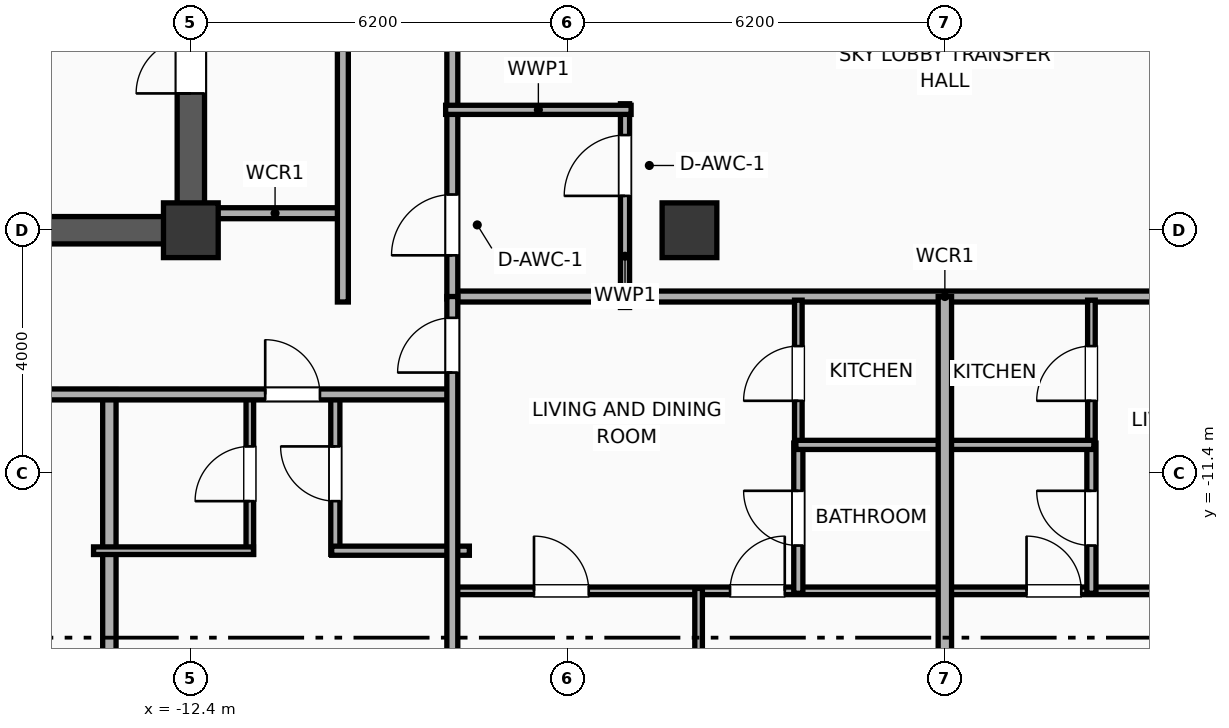
"""IFC4 building model, lengths in metres.
Left out: names, types, materials, properties, quantities, classifications, styles, units other than length and angle.
Written with IfcOpenShell. Run it as: python <this file> out.ifc"""

import sys

from ifc_helpers import new_model, si_unit, direction, frame, frame_2d, origin, origin_2d, place, context, subcontext, project, spatial, rectangle, extrude, element, fill, save


model = new_model("IFC4")
c1 = context("Model", 3, precision=1e-05, world=origin(), true_north=direction((0.0, 1.0)))
c2 = subcontext(c1, "Body", "Model", "MODEL_VIEW")
j1 = project(units=[si_unit("LENGTHUNIT", "METRE"), si_unit("PLANEANGLEUNIT", "RADIAN")], contexts=[c1])
p1 = place(None, origin())
s1 = spatial("IfcSite", under=j1, at=p1, CompositionType="ELEMENT")
p2 = place(p1, origin())
s2 = spatial("IfcBuilding", under=s1, at=p2, CompositionType="ELEMENT")
p3 = place(p2, frame((0.0, 0.0, 200.2)))
s3 = spatial("IfcBuildingStorey", under=s2, at=p3, CompositionType="ELEMENT", Elevation=200.2)
p4 = place(p3, frame((-12.4, -7.4, 0.0), z_axis=(0.0, 0.0, 1.0), x_axis=(1.0, 0.0, 0.0)))
e1 = element("IfcColumn", 1, at=p4, inside=s3, PredefinedType="COLUMN", context=c2, shape_type="SweptSolid", body=[
    extrude(rectangle(XDim=0.9, YDim=0.9, at=origin_2d()), origin(), (0.0, 0.0, 1.0), 3.9),
])
p5 = place(p3, frame((-19.425, -7.4, 0.0), z_axis=(0.0, 0.0, 1.0), x_axis=(1.0, 0.0, 0.0)))
e2 = element("IfcWall", 2, at=p5, inside=s3, PredefinedType="SHEAR", context=c2, shape_type="SweptSolid", body=[
    extrude(rectangle(XDim=7.25, YDim=0.45, at=frame_2d((3.625, 0.0))), origin(), (0.0, 0.0, 1.0), 3.65),
])
p6 = place(p3, frame((-12.4, -7.4, 0.0), z_axis=(0.0, 0.0, 1.0), x_axis=(0.0, 1.0, 0.0)))
e3 = element("IfcWall", 3, at=p6, inside=s3, PredefinedType="SHEAR", context=c2, shape_type="SweptSolid", body=[
    extrude(rectangle(XDim=14.8, YDim=0.45, at=frame_2d((7.4, 0.0))), origin(), (0.0, 0.0, 1.0), 3.65),
])
p7 = place(p6, frame((6.05, 0.0, 0.0)))
e4 = element("IfcOpeningElement", 4, at=p7, cuts=e3, PredefinedType="OPENING", context=c2, shape_type="SweptSolid", body=[
    extrude(rectangle(XDim=1.1, YDim=2.05, at=frame_2d((0.55, 1.025))), frame((0.0, 0.235, 0.0), z_axis=(0.0, -1.0, 0.0), x_axis=(1.0, 0.0, 0.0)), (0.0, 0.0, 1.0), 0.47),
])
p8 = place(p6, frame((8.6, 0.0, 0.0)))
e5 = element("IfcOpeningElement", 5, at=p8, cuts=e3, PredefinedType="OPENING", context=c2, shape_type="SweptSolid", body=[
    extrude(rectangle(XDim=1.1, YDim=2.05, at=frame_2d((0.55, 1.025))), frame((0.0, 0.235, 0.0), z_axis=(0.0, -1.0, 0.0), x_axis=(1.0, 0.0, 0.0)), (0.0, 0.0, 1.0), 0.47),
])
p9 = place(p6, frame((10.53, 0.0, 0.0)))
e6 = element("IfcOpeningElement", 6, at=p9, cuts=e3, PredefinedType="OPENING", context=c2, shape_type="SweptSolid", body=[
    extrude(rectangle(XDim=1.1, YDim=2.05, at=frame_2d((0.55, 1.025))), frame((0.0, 0.235, 0.0), z_axis=(0.0, -1.0, 0.0), x_axis=(1.0, 0.0, 0.0)), (0.0, 0.0, 1.0), 0.47),
])
p10 = place(p6, frame((2.25, 0.0, 0.0)))
e7 = element("IfcOpeningElement", 7, at=p10, cuts=e3, PredefinedType="OPENING", context=c2, shape_type="SweptSolid", body=[
    extrude(rectangle(XDim=0.9, YDim=2.05, at=frame_2d((0.45, 1.025))), frame((0.0, 0.235, 0.0), z_axis=(0.0, -1.0, 0.0), x_axis=(1.0, 0.0, 0.0)), (0.0, 0.0, 1.0), 0.47),
])
p11 = place(p3, frame((-4.2, -7.4, 0.0), z_axis=(0.0, 0.0, 1.0), x_axis=(1.0, 0.0, 0.0)))
e8 = element("IfcColumn", 8, at=p11, inside=s3, PredefinedType="COLUMN", context=c2, shape_type="SweptSolid", body=[
    extrude(rectangle(XDim=0.9, YDim=0.9, at=origin_2d()), origin(), (0.0, 0.0, 1.0), 3.9),
])
p12 = place(p3, frame((-12.15, -7.12, 0.0), z_axis=(0.0, 0.0, 1.0), x_axis=(1.0, 0.0, 0.0)))
e9 = element("IfcWall", 9, at=p12, inside=s3, PredefinedType="PARTITIONING", context=c2, shape_type="SweptSolid", body=[
    extrude(rectangle(XDim=2.27, YDim=0.18, at=frame_2d((1.135, 0.0))), origin(), (0.0, 0.0, 1.0), 3.65),
])
p13 = place(p3, frame((-9.9, -8.58, 0.0), z_axis=(0.0, 0.0, 1.0), x_axis=(0.0, 1.0, 0.0)))
e10 = element("IfcWall", 10, at=p13, inside=s3, PredefinedType="PARTITIONING", context=c2, shape_type="SweptSolid", body=[
    extrude(rectangle(XDim=17.16, YDim=0.18, at=frame_2d((8.58, 0.0))), origin(), (0.0, 0.0, 1.0), 3.65),
])
p14 = place(p13, frame((7.172, 0.0, 0.0)))
e11 = element("IfcOpeningElement", 11, at=p14, cuts=e10, PredefinedType="OPENING", context=c2, shape_type="SweptSolid", body=[
    extrude(rectangle(XDim=1.1, YDim=2.05, at=frame_2d((0.55, 1.025))), frame((0.0, 0.1, 0.0), z_axis=(0.0, -1.0, 0.0), x_axis=(1.0, 0.0, 0.0)), (0.0, 0.0, 1.0), 0.2),
])
p15 = place(p3, frame((-8.15, -8.49, 0.0), z_axis=(0.0, 0.0, 1.0), x_axis=(1.0, 0.0, 0.0)))
e12 = element("IfcWall", 12, at=p15, inside=s3, PredefinedType="PARTITIONING", context=c2, shape_type="SweptSolid", body=[
    extrude(rectangle(XDim=16.3, YDim=0.18, at=frame_2d((8.15, 0.0))), origin(), (0.0, 0.0, 1.0), 3.65),
])
p16 = place(p3, frame((-8.1, -8.53, 0.0), z_axis=(0.0, 0.0, 1.0), x_axis=(0.0, 1.0, 0.0)))
e13 = element("IfcWall", 13, at=p16, inside=s3, PredefinedType="PARTITIONING", context=c2, shape_type="SweptSolid", body=[
    extrude(rectangle(XDim=7.61, YDim=0.18, at=frame_2d((3.805, 0.0))), origin(), (0.0, 0.0, 1.0), 3.65),
])
p17 = place(p16, frame((0.718, 0.0, 0.0)))
e14 = element("IfcOpeningElement", 14, at=p17, cuts=e13, PredefinedType="OPENING", context=c2, shape_type="SweptSolid", body=[
    extrude(rectangle(XDim=1.0, YDim=2.05, at=frame_2d((0.5, 1.025))), frame((0.0, 0.1, 0.0), z_axis=(0.0, -1.0, 0.0), x_axis=(1.0, 0.0, 0.0)), (0.0, 0.0, 1.0), 0.2),
])
p18 = place(p3, frame((-5.26, -8.67, 0.0), z_axis=(0.0, 0.0, 1.0), x_axis=(0.0, 1.0, 0.0)))
e15 = element("IfcWall", 15, at=p18, inside=s3, PredefinedType="PLUMBINGWALL", context=c2, shape_type="SweptSolid", body=[
    extrude(rectangle(XDim=3.35, YDim=0.15, at=frame_2d((1.675, 0.0))), origin(), (0.0, 0.0, 1.0), 3.65),
])
p19 = place(p18, frame((1.835, 0.0, 0.0)))
e16 = element("IfcOpeningElement", 16, at=p19, cuts=e15, PredefinedType="OPENING", context=c2, shape_type="SweptSolid", body=[
    extrude(rectangle(XDim=1.0, YDim=2.05, at=frame_2d((0.5, 1.025))), frame((0.0, 0.085, 0.0), z_axis=(0.0, -1.0, 0.0), x_axis=(1.0, 0.0, 0.0)), (0.0, 0.0, 1.0), 0.17),
])
p20 = place(p3, frame((-8.21, -5.42, 0.0), z_axis=(0.0, 0.0, 1.0), x_axis=(1.0, 0.0, 0.0)))
e17 = element("IfcWall", 17, at=p20, inside=s3, PredefinedType="PLUMBINGWALL", context=c2, shape_type="SweptSolid", body=[
    extrude(rectangle(XDim=3.05, YDim=0.15, at=frame_2d((1.525, 0.0))), origin(), (0.0, 0.0, 1.0), 3.65),
])
p21 = place(p3, frame((-13.74, -18.83, 0.0), z_axis=(0.0, 0.0, 1.0), x_axis=(0.0, 1.0, 0.0)))
e18 = element("IfcWall", 18, at=p21, inside=s3, PredefinedType="PARTITIONING", context=c2, shape_type="SweptSolid", body=[
    extrude(rectangle(XDim=8.81, YDim=0.22, at=frame_2d((4.405, 0.0))), origin(), (0.0, 0.0, 1.0), 3.65),
])
p22 = place(p3, frame((-11.43, -12.73, 0.0), z_axis=(0.0, 0.0, 1.0), x_axis=(0.0, 1.0, 0.0)))
e19 = element("IfcWall", 19, at=p22, inside=s3, PredefinedType="PARTITIONING", context=c2, shape_type="SweptSolid", body=[
    extrude(rectangle(XDim=2.65, YDim=0.125, at=frame_2d((1.325, 0.0))), origin(), (0.0, 0.0, 1.0), 3.65),
])
p23 = place(p22, frame((0.875, 0.0, 0.0)))
e20 = element("IfcOpeningElement", 20, at=p23, cuts=e19, PredefinedType="OPENING", context=c2, shape_type="SweptSolid", body=[
    extrude(rectangle(XDim=0.9, YDim=2.05, at=frame_2d((0.45, 1.025))), frame((0.0, 0.073, 0.0), z_axis=(0.0, -1.0, 0.0), x_axis=(1.0, 0.0, 0.0)), (0.0, 0.0, 1.0), 0.145),
])
p24 = place(p3, frame((-10.024, -12.73, 0.0), z_axis=(0.0, 0.0, 1.0), x_axis=(0.0, 1.0, 0.0)))
e21 = element("IfcWall", 21, at=p24, inside=s3, PredefinedType="PLUMBINGWALL", context=c2, shape_type="SweptSolid", body=[
    extrude(rectangle(XDim=2.65, YDim=0.15, at=frame_2d((1.325, 0.0))), origin(), (0.0, 0.0, 1.0), 3.65),
])
p25 = place(p24, frame((0.875, 0.0, 0.0)))
e22 = element("IfcOpeningElement", 22, at=p25, cuts=e21, PredefinedType="OPENING", context=c2, shape_type="SweptSolid", body=[
    extrude(rectangle(XDim=0.9, YDim=2.05, at=frame_2d((0.45, 1.025))), frame((0.0, 0.085, 0.0), z_axis=(0.0, -1.0, 0.0), x_axis=(1.0, 0.0, 0.0)), (0.0, 0.0, 1.0), 0.17),
])
p26 = place(p3, frame((-14.0, -12.67, 0.0), z_axis=(0.0, 0.0, 1.0), x_axis=(1.0, 0.0, 0.0)))
e23 = element("IfcWall", 23, at=p26, inside=s3, PredefinedType="PARTITIONING", context=c2, shape_type="SweptSolid", body=[
    extrude(rectangle(XDim=2.63, YDim=0.125, at=frame_2d((1.315, 0.0))), origin(), (0.0, 0.0, 1.0), 3.65),
])
p27 = place(p3, frame((-10.084, -12.67, 0.0), z_axis=(0.0, 0.0, 1.0), x_axis=(1.0, 0.0, 0.0)))
e24 = element("IfcWall", 24, at=p27, inside=s3, PredefinedType="PLUMBINGWALL", context=c2, shape_type="SweptSolid", body=[
    extrude(rectangle(XDim=2.264, YDim=0.15, at=frame_2d((1.132, 0.0))), origin(), (0.0, 0.0, 1.0), 3.65),
])
p28 = place(p3, frame((-19.5, -10.1, 0.0), z_axis=(0.0, 0.0, 1.0), x_axis=(1.0, 0.0, 0.0)))
e25 = element("IfcWall", 25, at=p28, inside=s3, PredefinedType="PARTITIONING", context=c2, shape_type="SweptSolid", body=[
    extrude(rectangle(XDim=11.42, YDim=0.18, at=frame_2d((5.71, 0.0))), origin(), (0.0, 0.0, 1.0), 3.65),
])
p29 = place(p28, frame((2.324, 0.0, 0.0)))
e26 = element("IfcOpeningElement", 26, at=p29, cuts=e25, PredefinedType="OPENING", context=c2, shape_type="SweptSolid", body=[
    extrude(rectangle(XDim=1.15, YDim=2.05, at=frame_2d((0.575, 1.025))), frame((0.0, 0.1, 0.0), z_axis=(0.0, -1.0, 0.0), x_axis=(1.0, 0.0, 0.0)), (0.0, 0.0, 1.0), 0.2),
])
p30 = place(p28, frame((8.323, 0.0, 0.0)))
e27 = element("IfcOpeningElement", 27, at=p30, cuts=e25, PredefinedType="OPENING", context=c2, shape_type="SweptSolid", body=[
    extrude(rectangle(XDim=0.9, YDim=2.05, at=frame_2d((0.45, 1.025))), frame((0.0, 0.1, 0.0), z_axis=(0.0, -1.0, 0.0), x_axis=(1.0, 0.0, 0.0)), (0.0, 0.0, 1.0), 0.2),
])
p31 = place(p3, frame((-8.08, -13.33, 0.0), z_axis=(0.0, 0.0, 1.0), x_axis=(1.0, 0.0, 0.0)))
e28 = element("IfcWall", 28, at=p31, inside=s3, PredefinedType="PARTITIONING", context=c2, shape_type="SweptSolid", body=[
    extrude(rectangle(XDim=8.06, YDim=0.125, at=frame_2d((4.03, 0.0))), origin(), (0.0, 0.0, 1.0), 3.65),
])
p32 = place(p31, frame((1.323, 0.0, 0.0)))
e29 = element("IfcOpeningElement", 29, at=p32, cuts=e28, PredefinedType="OPENING", context=c2, shape_type="SweptSolid", body=[
    extrude(rectangle(XDim=0.9, YDim=2.05, at=frame_2d((0.45, 1.025))), frame((0.0, 0.073, 0.0), z_axis=(0.0, -1.0, 0.0), x_axis=(1.0, 0.0, 0.0)), (0.0, 0.0, 1.0), 0.145),
])
p33 = place(p31, frame((4.547, 0.0, 0.0)))
e30 = element("IfcOpeningElement", 30, at=p33, cuts=e28, PredefinedType="OPENING", context=c2, shape_type="SweptSolid", body=[
    extrude(rectangle(XDim=0.9, YDim=2.05, at=frame_2d((0.45, 1.025))), frame((0.0, 0.073, 0.0), z_axis=(0.0, -1.0, 0.0), x_axis=(1.0, 0.0, 0.0)), (0.0, 0.0, 1.0), 0.145),
])
p34 = place(p3, frame((-2.41, -10.96, 0.0), z_axis=(0.0, 0.0, 1.0), x_axis=(0.0, 1.0, 0.0)))
e31 = element("IfcWall", 31, at=p34, inside=s3, PredefinedType="PARTITIONING", context=c2, shape_type="SweptSolid", body=[
    extrude(rectangle(XDim=2.41, YDim=0.125, at=frame_2d((1.205, 0.0))), origin(), (0.0, 0.0, 1.0), 3.65),
])
p35 = place(p34, frame((0.755, 0.0, 0.0)))
e32 = element("IfcOpeningElement", 32, at=p35, cuts=e31, PredefinedType="OPENING", context=c2, shape_type="SweptSolid", body=[
    extrude(rectangle(XDim=0.9, YDim=2.05, at=frame_2d((0.45, 1.025))), frame((0.0, 0.073, 0.0), z_axis=(0.0, -1.0, 0.0), x_axis=(1.0, 0.0, 0.0)), (0.0, 0.0, 1.0), 0.145),
])
p36 = place(p3, frame((-2.41, -13.37, 0.0), z_axis=(0.0, 0.0, 1.0), x_axis=(0.0, 1.0, 0.0)))
e33 = element("IfcWall", 33, at=p36, inside=s3, PredefinedType="PLUMBINGWALL", context=c2, shape_type="SweptSolid", body=[
    extrude(rectangle(XDim=2.47, YDim=0.15, at=frame_2d((1.235, 0.0))), origin(), (0.0, 0.0, 1.0), 3.65),
])
p37 = place(p36, frame((0.785, 0.0, 0.0)))
e34 = element("IfcOpeningElement", 34, at=p37, cuts=e33, PredefinedType="OPENING", context=c2, shape_type="SweptSolid", body=[
    extrude(rectangle(XDim=0.9, YDim=2.05, at=frame_2d((0.45, 1.025))), frame((0.0, 0.085, 0.0), z_axis=(0.0, -1.0, 0.0), x_axis=(1.0, 0.0, 0.0)), (0.0, 0.0, 1.0), 0.17),
])
p38 = place(p3, frame((-2.45, -10.93, 0.0), z_axis=(0.0, 0.0, 1.0), x_axis=(1.0, 0.0, 0.0)))
e35 = element("IfcWall", 35, at=p38, inside=s3, PredefinedType="PLUMBINGWALL", context=c2, shape_type="SweptSolid", body=[
    extrude(rectangle(XDim=2.43, YDim=0.15, at=frame_2d((1.215, 0.0))), origin(), (0.0, 0.0, 1.0), 3.65),
])
p39 = place(p3, frame((-4.05, -18.83, 0.0), z_axis=(0.0, 0.0, 1.0), x_axis=(0.0, 1.0, 0.0)))
e36 = element("IfcWall", 36, at=p39, inside=s3, PredefinedType="PARTITIONING", context=c2, shape_type="SweptSolid", body=[
    extrude(rectangle(XDim=5.54, YDim=0.125, at=frame_2d((2.77, 0.0))), origin(), (0.0, 0.0, 1.0), 2.54),
])
p40 = place(p3, frame((-8.1, -18.83, 0.0), z_axis=(0.0, 0.0, 1.0), x_axis=(0.0, 1.0, 0.0)))
e37 = element("IfcWall", 37, at=p40, inside=s3, PredefinedType="PARTITIONING", context=c2, shape_type="SweptSolid", body=[
    extrude(rectangle(XDim=10.34, YDim=0.18, at=frame_2d((5.17, 0.0))), origin(), (0.0, 0.0, 1.0), 3.65),
])
p41 = place(p40, frame((9.09, 0.0, 0.0)))
e38 = element("IfcOpeningElement", 38, at=p41, cuts=e37, PredefinedType="OPENING", context=c2, shape_type="SweptSolid", body=[
    extrude(rectangle(XDim=0.9, YDim=2.05, at=frame_2d((0.45, 1.025))), frame((0.0, 0.1, 0.0), z_axis=(0.0, -1.0, 0.0), x_axis=(1.0, 0.0, 0.0)), (0.0, 0.0, 1.0), 0.2),
])
p42 = place(p3, frame((0.02, -13.33, 0.0), z_axis=(0.0, 0.0, 1.0), x_axis=(1.0, 0.0, 0.0)))
e39 = element("IfcWall", 39, at=p42, inside=s3, PredefinedType="PARTITIONING", context=c2, shape_type="SweptSolid", body=[
    extrude(rectangle(XDim=8.06, YDim=0.125, at=frame_2d((4.03, 0.0))), origin(), (0.0, 0.0, 1.0), 3.65),
])
p43 = place(p42, frame((1.323, 0.0, 0.0)))
e40 = element("IfcOpeningElement", 40, at=p43, cuts=e39, PredefinedType="OPENING", context=c2, shape_type="SweptSolid", body=[
    extrude(rectangle(XDim=0.9, YDim=2.05, at=frame_2d((0.45, 1.025))), frame((0.0, 0.073, 0.0), z_axis=(0.0, -1.0, 0.0), x_axis=(1.0, 0.0, 0.0)), (0.0, 0.0, 1.0), 0.145),
])
p44 = place(p42, frame((5.837, 0.0, 0.0)))
e41 = element("IfcOpeningElement", 41, at=p44, cuts=e39, PredefinedType="OPENING", context=c2, shape_type="SweptSolid", body=[
    extrude(rectangle(XDim=0.9, YDim=2.05, at=frame_2d((0.45, 1.025))), frame((0.0, 0.073, 0.0), z_axis=(0.0, -1.0, 0.0), x_axis=(1.0, 0.0, 0.0)), (0.0, 0.0, 1.0), 0.145),
])
p45 = place(p3, frame((2.41, -10.96, 0.0), z_axis=(0.0, 0.0, 1.0), x_axis=(0.0, 1.0, 0.0)))
e42 = element("IfcWall", 42, at=p45, inside=s3, PredefinedType="PARTITIONING", context=c2, shape_type="SweptSolid", body=[
    extrude(rectangle(XDim=2.41, YDim=0.125, at=frame_2d((1.205, 0.0))), origin(), (0.0, 0.0, 1.0), 3.65),
])
p46 = place(p45, frame((0.755, 0.0, 0.0)))
e43 = element("IfcOpeningElement", 43, at=p46, cuts=e42, PredefinedType="OPENING", context=c2, shape_type="SweptSolid", body=[
    extrude(rectangle(XDim=0.9, YDim=2.05, at=frame_2d((0.45, 1.025))), frame((0.0, 0.073, 0.0), z_axis=(0.0, -1.0, 0.0), x_axis=(1.0, 0.0, 0.0)), (0.0, 0.0, 1.0), 0.145),
])
p47 = place(p3, frame((2.41, -13.37, 0.0), z_axis=(0.0, 0.0, 1.0), x_axis=(0.0, 1.0, 0.0)))
e44 = element("IfcWall", 44, at=p47, inside=s3, PredefinedType="PLUMBINGWALL", context=c2, shape_type="SweptSolid", body=[
    extrude(rectangle(XDim=2.47, YDim=0.15, at=frame_2d((1.235, 0.0))), origin(), (0.0, 0.0, 1.0), 3.65),
])
p48 = place(p47, frame((0.785, 0.0, 0.0)))
e45 = element("IfcOpeningElement", 45, at=p48, cuts=e44, PredefinedType="OPENING", context=c2, shape_type="SweptSolid", body=[
    extrude(rectangle(XDim=0.9, YDim=2.05, at=frame_2d((0.45, 1.025))), frame((0.0, 0.085, 0.0), z_axis=(0.0, -1.0, 0.0), x_axis=(1.0, 0.0, 0.0)), (0.0, 0.0, 1.0), 0.17),
])
p49 = place(p3, frame((0.02, -10.93, 0.0), z_axis=(0.0, 0.0, 1.0), x_axis=(1.0, 0.0, 0.0)))
e46 = element("IfcWall", 46, at=p49, inside=s3, PredefinedType="PLUMBINGWALL", context=c2, shape_type="SweptSolid", body=[
    extrude(rectangle(XDim=2.43, YDim=0.15, at=frame_2d((1.215, 0.0))), origin(), (0.0, 0.0, 1.0), 3.65),
])
p50 = place(p3, frame((0.0, -18.83, 0.0), z_axis=(0.0, 0.0, 1.0), x_axis=(0.0, 1.0, 0.0)))
e47 = element("IfcWall", 47, at=p50, inside=s3, PredefinedType="PARTITIONING", context=c2, shape_type="SweptSolid", body=[
    extrude(rectangle(XDim=10.34, YDim=0.22, at=frame_2d((5.17, 0.0))), origin(), (0.0, 0.0, 1.0), 3.65),
])
p51 = place(p17, origin())
e48 = element("IfcDoor", 48, at=p51, inside=s3, OperationType="SINGLE_SWING_LEFT", PredefinedType="DOOR", context=c2, shape_type="SweptSolid", body=[
    extrude(rectangle(XDim=1.0, YDim=2.05, at=frame_2d((0.5, 1.025))), frame((0.0, 0.025, 0.0), z_axis=(0.0, -1.0, 0.0), x_axis=(1.0, 0.0, 0.0)), (0.0, 0.0, 1.0), 0.05),
])
fill(e14, e48)
p52 = place(p19, origin())
e49 = element("IfcDoor", 49, at=p52, inside=s3, OperationType="SINGLE_SWING_LEFT", PredefinedType="DOOR", context=c2, shape_type="SweptSolid", body=[
    extrude(rectangle(XDim=1.0, YDim=2.05, at=frame_2d((0.5, 1.025))), frame((0.0, 0.025, 0.0), z_axis=(0.0, -1.0, 0.0), x_axis=(1.0, 0.0, 0.0)), (0.0, 0.0, 1.0), 0.05),
])
fill(e16, e49)
p53 = place(p23, origin())
e50 = element("IfcDoor", 50, at=p53, inside=s3, OperationType="SINGLE_SWING_LEFT", PredefinedType="DOOR", context=c2, shape_type="SweptSolid", body=[
    extrude(rectangle(XDim=0.9, YDim=2.05, at=frame_2d((0.45, 1.025))), frame((0.0, 0.025, 0.0), z_axis=(0.0, -1.0, 0.0), x_axis=(1.0, 0.0, 0.0)), (0.0, 0.0, 1.0), 0.05),
])
fill(e20, e50)
p54 = place(p25, origin())
e51 = element("IfcDoor", 51, at=p54, inside=s3, OperationType="SINGLE_SWING_RIGHT", PredefinedType="DOOR", context=c2, shape_type="SweptSolid", body=[
    extrude(rectangle(XDim=0.9, YDim=2.05, at=frame_2d((0.45, 1.025))), frame((0.0, 0.025, 0.0), z_axis=(0.0, -1.0, 0.0), x_axis=(1.0, 0.0, 0.0)), (0.0, 0.0, 1.0), 0.05),
])
fill(e22, e51)
p55 = place(p30, origin())
e52 = element("IfcDoor", 52, at=p55, inside=s3, OperationType="SINGLE_SWING_LEFT", PredefinedType="DOOR", context=c2, shape_type="SweptSolid", body=[
    extrude(rectangle(XDim=0.9, YDim=2.05, at=frame_2d((0.45, 1.025))), frame((0.0, 0.025, 0.0), z_axis=(0.0, -1.0, 0.0), x_axis=(1.0, 0.0, 0.0)), (0.0, 0.0, 1.0), 0.05),
])
fill(e27, e52)
p56 = place(p32, origin())
e53 = element("IfcDoor", 53, at=p56, inside=s3, OperationType="SINGLE_SWING_LEFT", PredefinedType="DOOR", context=c2, shape_type="SweptSolid", body=[
    extrude(rectangle(XDim=0.9, YDim=2.05, at=frame_2d((0.45, 1.025))), frame((0.0, 0.025, 0.0), z_axis=(0.0, -1.0, 0.0), x_axis=(1.0, 0.0, 0.0)), (0.0, 0.0, 1.0), 0.05),
])
fill(e29, e53)
p57 = place(p33, origin())
e54 = element("IfcDoor", 54, at=p57, inside=s3, OperationType="SINGLE_SWING_RIGHT", PredefinedType="DOOR", context=c2, shape_type="SweptSolid", body=[
    extrude(rectangle(XDim=0.9, YDim=2.05, at=frame_2d((0.45, 1.025))), frame((0.0, 0.025, 0.0), z_axis=(0.0, -1.0, 0.0), x_axis=(1.0, 0.0, 0.0)), (0.0, 0.0, 1.0), 0.05),
])
fill(e30, e54)
p58 = place(p35, origin())
e55 = element("IfcDoor", 55, at=p58, inside=s3, OperationType="SINGLE_SWING_LEFT", PredefinedType="DOOR", context=c2, shape_type="SweptSolid", body=[
    extrude(rectangle(XDim=0.9, YDim=2.05, at=frame_2d((0.45, 1.025))), frame((0.0, 0.025, 0.0), z_axis=(0.0, -1.0, 0.0), x_axis=(1.0, 0.0, 0.0)), (0.0, 0.0, 1.0), 0.05),
])
fill(e32, e55)
p59 = place(p37, origin())
e56 = element("IfcDoor", 56, at=p59, inside=s3, OperationType="SINGLE_SWING_RIGHT", PredefinedType="DOOR", context=c2, shape_type="SweptSolid", body=[
    extrude(rectangle(XDim=0.9, YDim=2.05, at=frame_2d((0.45, 1.025))), frame((0.0, 0.025, 0.0), z_axis=(0.0, -1.0, 0.0), x_axis=(1.0, 0.0, 0.0)), (0.0, 0.0, 1.0), 0.05),
])
fill(e34, e56)
p60 = place(p41, origin())
e57 = element("IfcDoor", 57, at=p60, inside=s3, OperationType="SINGLE_SWING_LEFT", PredefinedType="DOOR", context=c2, shape_type="SweptSolid", body=[
    extrude(rectangle(XDim=0.9, YDim=2.05, at=frame_2d((0.45, 1.025))), frame((0.0, 0.025, 0.0), z_axis=(0.0, -1.0, 0.0), x_axis=(1.0, 0.0, 0.0)), (0.0, 0.0, 1.0), 0.05),
])
fill(e38, e57)
p61 = place(p43, origin())
e58 = element("IfcDoor", 58, at=p61, inside=s3, OperationType="SINGLE_SWING_LEFT", PredefinedType="DOOR", context=c2, shape_type="SweptSolid", body=[
    extrude(rectangle(XDim=0.9, YDim=2.05, at=frame_2d((0.45, 1.025))), frame((0.0, 0.025, 0.0), z_axis=(0.0, -1.0, 0.0), x_axis=(1.0, 0.0, 0.0)), (0.0, 0.0, 1.0), 0.05),
])
fill(e40, e58)
p62 = place(p46, origin())
e59 = element("IfcDoor", 59, at=p62, inside=s3, OperationType="SINGLE_SWING_LEFT", PredefinedType="DOOR", context=c2, shape_type="SweptSolid", body=[
    extrude(rectangle(XDim=0.9, YDim=2.05, at=frame_2d((0.45, 1.025))), frame((0.0, 0.025, 0.0), z_axis=(0.0, -1.0, 0.0), x_axis=(1.0, 0.0, 0.0)), (0.0, 0.0, 1.0), 0.05),
])
fill(e43, e59)
p63 = place(p48, origin())
e60 = element("IfcDoor", 60, at=p63, inside=s3, OperationType="SINGLE_SWING_RIGHT", PredefinedType="DOOR", context=c2, shape_type="SweptSolid", body=[
    extrude(rectangle(XDim=0.9, YDim=2.05, at=frame_2d((0.45, 1.025))), frame((0.0, 0.025, 0.0), z_axis=(0.0, -1.0, 0.0), x_axis=(1.0, 0.0, 0.0)), (0.0, 0.0, 1.0), 0.05),
])
fill(e45, e60)
p64 = place(p10, origin())
e61 = element("IfcDoor", 61, at=p64, inside=s3, OperationType="SINGLE_SWING_LEFT", PredefinedType="DOOR", context=c2, shape_type="SweptSolid", body=[
    extrude(rectangle(XDim=0.9, YDim=2.05, at=frame_2d((0.45, 1.025))), frame((0.0, 0.025, 0.0), z_axis=(0.0, -1.0, 0.0), x_axis=(1.0, 0.0, 0.0)), (0.0, 0.0, 1.0), 0.05),
])
fill(e7, e61)
save(model, sys.argv[1])
